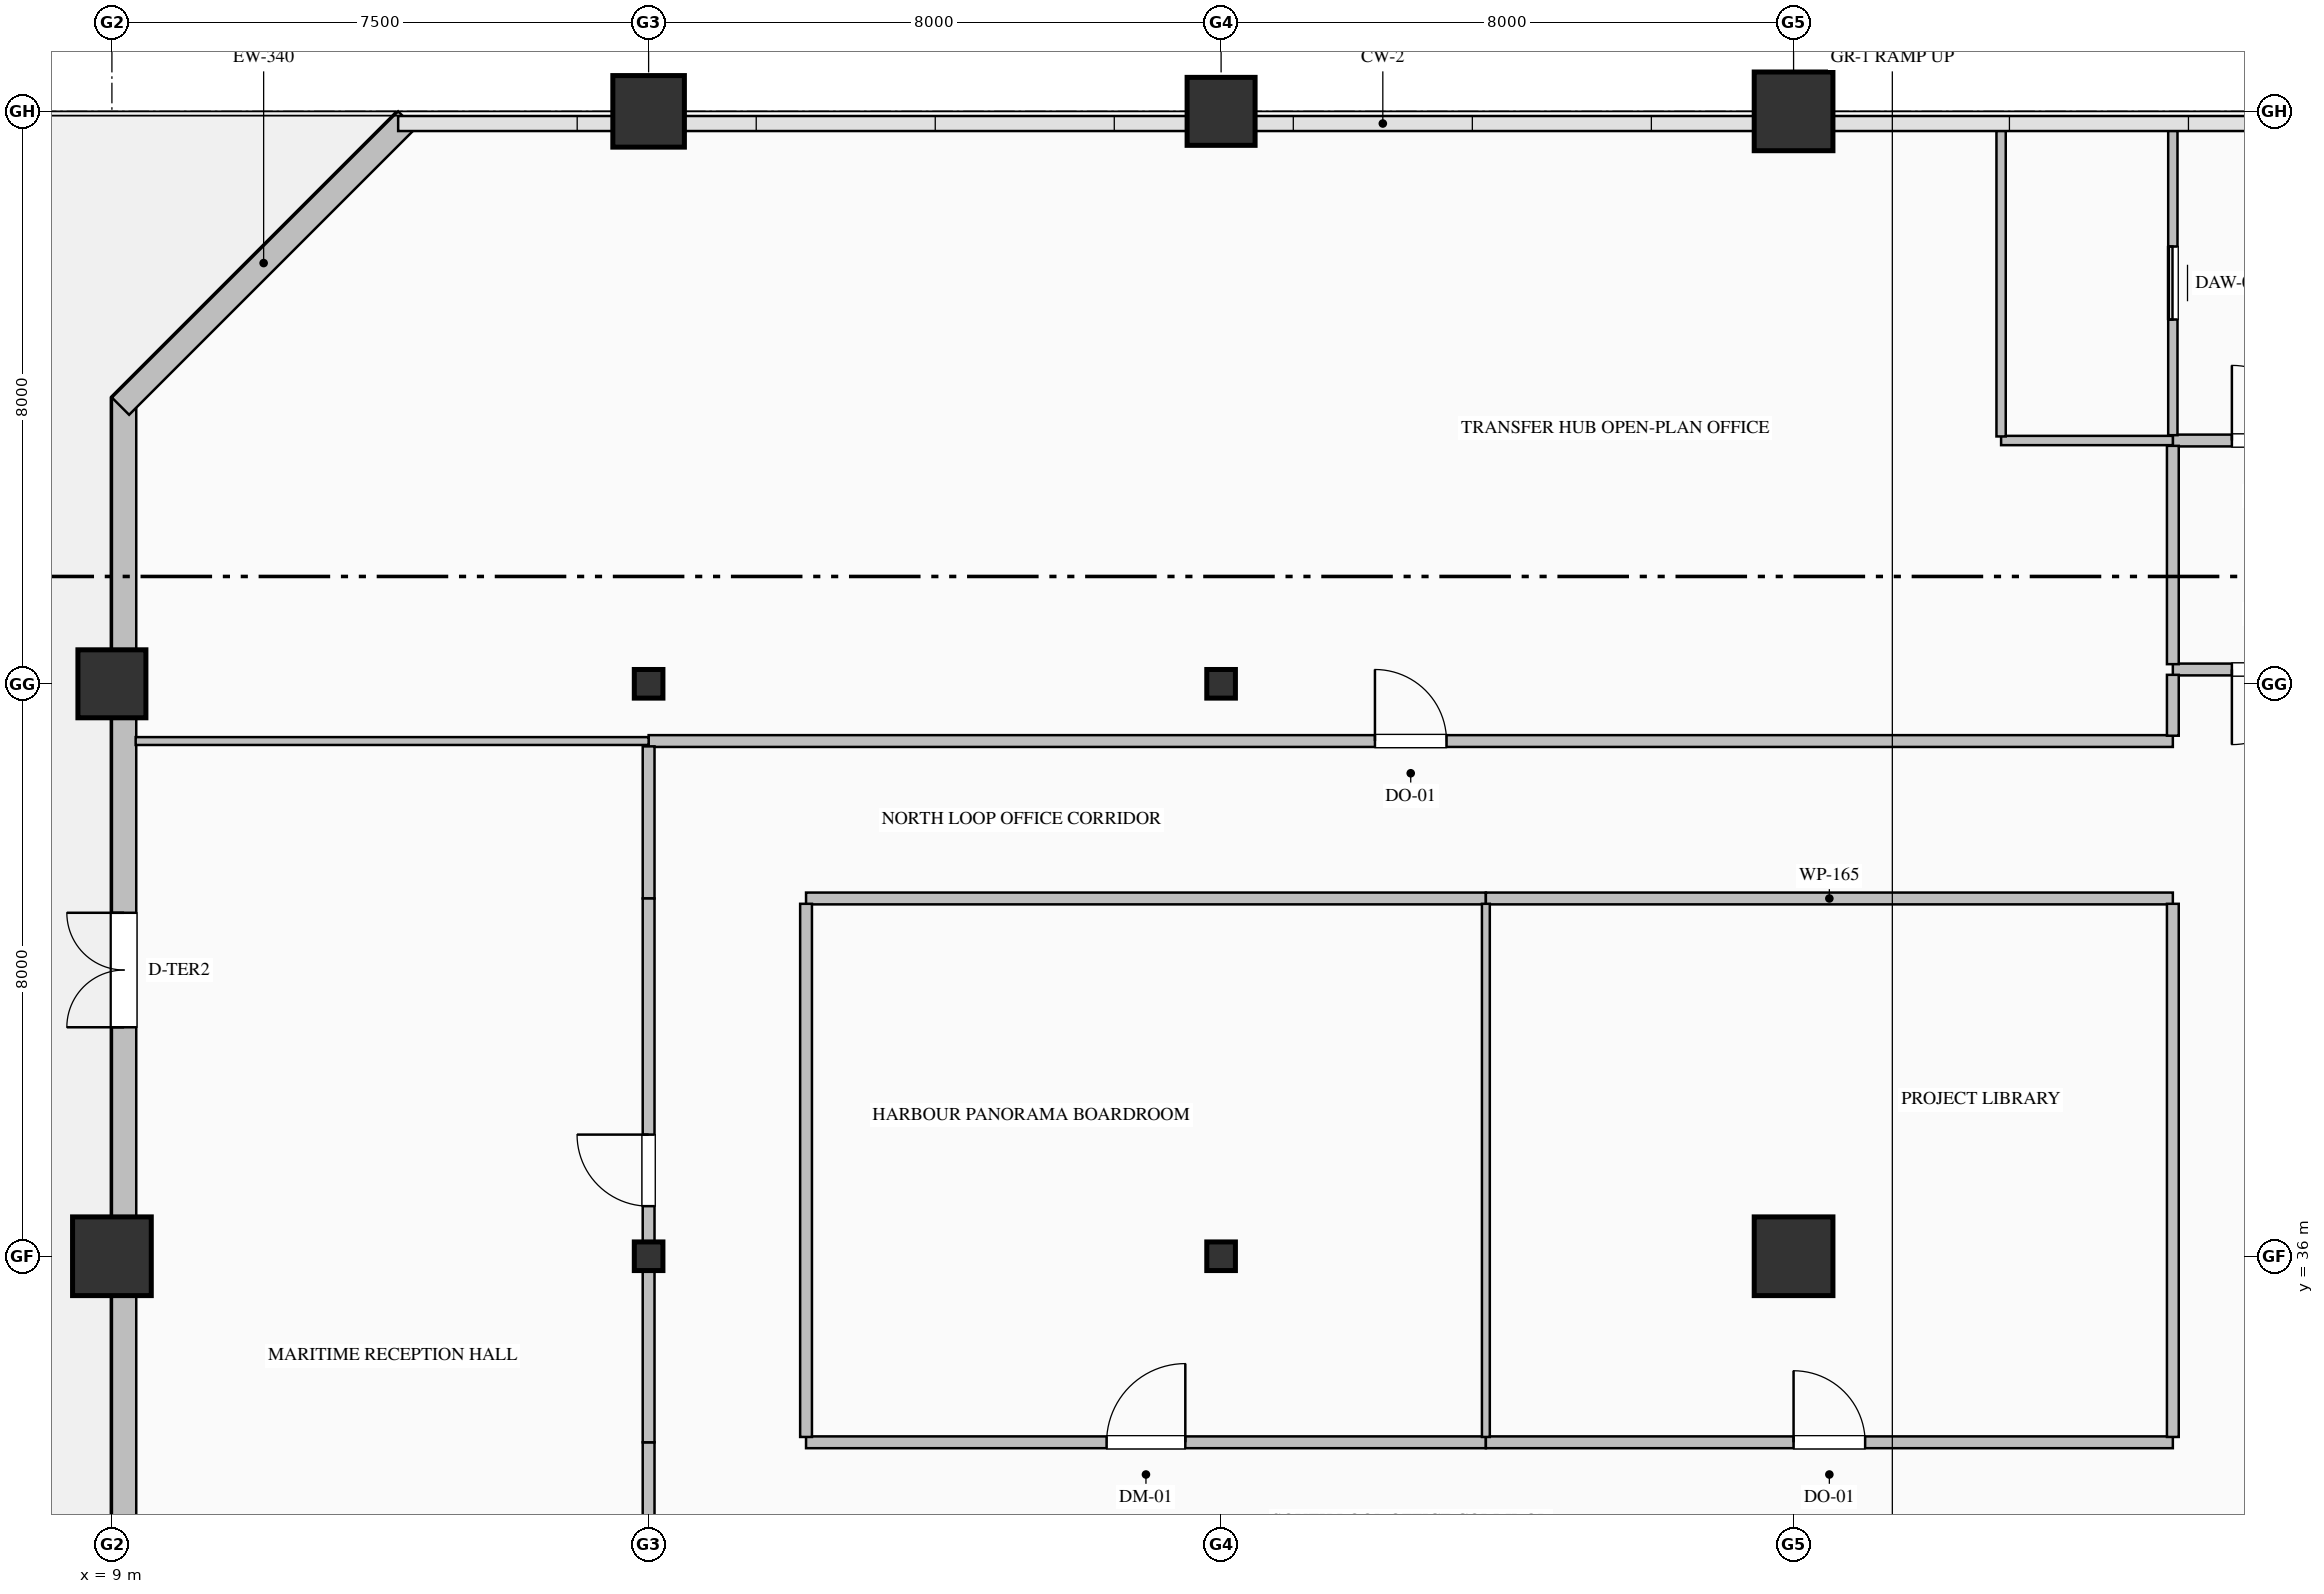
"""IFC4 building model, lengths in metres.
Left out: names, types, materials, properties, quantities, classifications, styles, units other than length and angle.
Written with IfcOpenShell. Run it as: python <this file> out.ifc"""

import sys

from ifc_helpers import new_model, si_unit, direction, frame, frame_2d, origin, origin_2d, place, context, subcontext, project, spatial, rectangle, hollow_rectangle, hollow_circle, i_section, extrude, element, fill, save


model = new_model("IFC4")
c1 = context("Model", 3, precision=1e-05, world=origin(), true_north=direction((0.0, 1.0)))
c2 = subcontext(c1, "Body", "Model", "MODEL_VIEW")
j1 = project(units=[si_unit("LENGTHUNIT", "METRE"), si_unit("PLANEANGLEUNIT", "RADIAN")], contexts=[c1])
p1 = place(None, origin())
s1 = spatial("IfcSite", under=j1, at=p1, CompositionType="ELEMENT")
p2 = place(p1, origin())
s2 = spatial("IfcBuilding", under=s1, at=p2, CompositionType="ELEMENT")
p3 = place(p2, frame((0.0, 0.0, 113.6)))
s3 = spatial("IfcBuildingStorey", under=s2, at=p3, CompositionType="ELEMENT", Elevation=113.6)
p4 = place(p3, frame((9.0, 36.0, 0.0), z_axis=(0.0, 0.0, 1.0), x_axis=(1.0, 0.0, 0.0)))
e1 = element("IfcColumn", 1, at=p4, inside=s3, PredefinedType="COLUMN", context=c2, shape_type="SweptSolid", body=[
    extrude(hollow_rectangle(XDim=1.1, YDim=1.1, WallThickness=0.04, at=origin_2d()), origin(), (0.0, 0.0, 1.0), 5.4),
])
p5 = place(p3, frame((9.0, 44.0, 0.0), z_axis=(0.0, 0.0, 1.0), x_axis=(1.0, 0.0, 0.0)))
e2 = element("IfcColumn", 2, at=p5, inside=s3, PredefinedType="COLUMN", context=c2, shape_type="SweptSolid", body=[
    extrude(hollow_rectangle(XDim=0.95, YDim=0.95, WallThickness=0.036, at=origin_2d()), origin(), (0.0, 0.0, 1.0), 5.4),
])
for number, where, z_axis, x_axis in (
    (3, (16.5, 36.0, 0.0), (0.0, 0.0, 1.0), (1.0, 0.0, 0.0)),
    (4, (16.5, 44.0, 0.0), (0.0, 0.0, 1.0), (1.0, 0.0, 0.0)),
):
    element("IfcColumn", number, at=place(p3, frame(where, z_axis=z_axis, x_axis=x_axis)), inside=s3, PredefinedType="COLUMN", context=c2, shape_type="SweptSolid", body=[
        extrude(i_section(OverallWidth=0.4, OverallDepth=0.4, WebThickness=0.013, FlangeThickness=0.021, FilletRadius=0.022, at=origin_2d()), origin(), (0.0, 0.0, 1.0), 5.4),
    ])
p6 = place(p3, frame((16.5, 52.0, 0.0), z_axis=(0.0, 0.0, 1.0), x_axis=(1.0, 0.0, 0.0)))
e5 = element("IfcColumn", 5, at=p6, inside=s3, PredefinedType="COLUMN", context=c2, shape_type="SweptSolid", body=[
    extrude(hollow_circle(Radius=0.5, WallThickness=0.036, at=origin_2d()), origin(), (0.0, 0.0, 1.0), 5.4),
])
for number, where, z_axis, x_axis in (
    (6, (24.5, 36.0, 0.0), (0.0, 0.0, 1.0), (1.0, 0.0, 0.0)),
    (7, (24.5, 44.0, 0.0), (0.0, 0.0, 1.0), (1.0, 0.0, 0.0)),
):
    element("IfcColumn", number, at=place(p3, frame(where, z_axis=z_axis, x_axis=x_axis)), inside=s3, PredefinedType="COLUMN", context=c2, shape_type="SweptSolid", body=[
        extrude(i_section(OverallWidth=0.4, OverallDepth=0.4, WebThickness=0.013, FlangeThickness=0.021, FilletRadius=0.022, at=origin_2d()), origin(), (0.0, 0.0, 1.0), 5.4),
    ])
p7 = place(p3, frame((24.5, 52.0, 0.0), z_axis=(0.0, 0.0, 1.0), x_axis=(1.0, 0.0, 0.0)))
e8 = element("IfcColumn", 8, at=p7, inside=s3, PredefinedType="COLUMN", context=c2, shape_type="SweptSolid", body=[
    extrude(hollow_rectangle(XDim=0.95, YDim=0.95, WallThickness=0.036, at=origin_2d()), origin(), (0.0, 0.0, 1.0), 5.4),
])
for number, where, z_axis, x_axis in (
    (9, (32.5, 36.0, 0.0), (0.0, 0.0, 1.0), (1.0, 0.0, 0.0)),
    (10, (32.5, 52.0, 0.0), (0.0, 0.0, 1.0), (1.0, 0.0, 0.0)),
):
    element("IfcColumn", number, at=place(p3, frame(where, z_axis=z_axis, x_axis=x_axis)), inside=s3, PredefinedType="COLUMN", context=c2, shape_type="SweptSolid", body=[
        extrude(hollow_rectangle(XDim=1.1, YDim=1.1, WallThickness=0.04, at=origin_2d()), origin(), (0.0, 0.0, 1.0), 5.4),
    ])
p8 = place(p3, frame((9.17, 32.0, 0.0), z_axis=(0.0, 0.0, 1.0), x_axis=(0.0, 1.0, 0.0)))
e11 = element("IfcWall", 11, at=p8, inside=s3, PredefinedType="SOLIDWALL", context=c2, shape_type="SweptSolid", body=[
    extrude(rectangle(XDim=16.0, YDim=0.34, at=frame_2d((8.0, 0.0))), origin(), (0.0, 0.0, 1.0), 4.665),
])
p9 = place(p8, frame((7.2, 0.0, 0.0)))
e12 = element("IfcOpeningElement", 12, at=p9, cuts=e11, PredefinedType="OPENING", context=c2, shape_type="SweptSolid", body=[
    extrude(rectangle(XDim=1.6, YDim=2.35, at=frame_2d((0.8, 1.175))), frame((0.0, 0.18, 0.0), z_axis=(0.0, -1.0, 0.0), x_axis=(1.0, 0.0, 0.0)), (0.0, 0.0, 1.0), 0.36),
])
p10 = place(p3, frame((9.12, 47.88, 0.0), z_axis=(0.0, 0.0, 1.0), x_axis=(0.707106781187, 0.707106781187, 0.0)))
e13 = element("IfcWall", 13, at=p10, inside=s3, PredefinedType="SOLIDWALL", context=c2, shape_type="SweptSolid", body=[
    extrude(rectangle(XDim=5.657, YDim=0.34, at=frame_2d((2.828, 0.0))), origin(), (0.0, 0.0, 1.0), 5.165),
])
p11 = place(p3, frame((37.8, 47.4, 0.0), z_axis=(0.0, 0.0, 1.0), x_axis=(1.0, 0.0, 0.0)))
e14 = element("IfcWall", 14, at=p11, inside=s3, PredefinedType="PARTITIONING", context=c2, shape_type="SweptSolid", body=[
    extrude(rectangle(XDim=2.7, YDim=0.165, at=frame_2d((1.35, 0.0))), origin(), (0.0, 0.0, 1.0), 5.165),
])
p12 = place(p11, frame((0.825, 0.0, 0.0)))
e15 = element("IfcOpeningElement", 15, at=p12, cuts=e14, PredefinedType="OPENING", context=c2, shape_type="SweptSolid", body=[
    extrude(rectangle(XDim=1.05, YDim=2.15, at=frame_2d((0.525, 1.075))), frame((0.0, 0.093, 0.0), z_axis=(0.0, -1.0, 0.0), x_axis=(1.0, 0.0, 0.0)), (0.0, 0.0, 1.0), 0.185),
])
p13 = place(p3, frame((40.5, 44.2, 0.0), z_axis=(0.0, 0.0, 1.0), x_axis=(-1.0, 0.0, 0.0)))
e16 = element("IfcWall", 16, at=p13, inside=s3, PredefinedType="PARTITIONING", context=c2, shape_type="SweptSolid", body=[
    extrude(rectangle(XDim=2.7, YDim=0.165, at=frame_2d((1.35, 0.0))), origin(), (0.0, 0.0, 1.0), 5.165),
])
p14 = place(p13, frame((0.825, 0.0, 0.0)))
e17 = element("IfcOpeningElement", 17, at=p14, cuts=e16, PredefinedType="OPENING", context=c2, shape_type="SweptSolid", body=[
    extrude(rectangle(XDim=1.05, YDim=2.15, at=frame_2d((0.525, 1.075))), frame((0.0, 0.093, 0.0), z_axis=(0.0, -1.0, 0.0), x_axis=(1.0, 0.0, 0.0)), (0.0, 0.0, 1.0), 0.185),
])
p15 = place(p3, frame((37.8, 44.274, 0.0), z_axis=(0.0, 0.0, 1.0), x_axis=(0.0, 1.0, 0.0)))
e18 = element("IfcWall", 18, at=p15, inside=s3, PredefinedType="PARTITIONING", context=c2, shape_type="SweptSolid", body=[
    extrude(rectangle(XDim=3.051, YDim=0.165, at=frame_2d((1.525, 0.0))), origin(), (0.0, 0.0, 1.0), 5.165),
])
p16 = place(p3, frame((37.8, 47.475, 0.0), z_axis=(0.0, 0.0, 1.0), x_axis=(0.0, 1.0, 0.0)))
e19 = element("IfcWall", 19, at=p16, inside=s3, PredefinedType="PARTITIONING", context=c2, shape_type="SweptSolid", body=[
    extrude(rectangle(XDim=4.253, YDim=0.13, at=frame_2d((2.127, 0.0))), origin(), (0.0, 0.0, 1.0), 5.165),
])
p17 = place(p16, frame((1.617, 0.0, 0.0)))
e20 = element("IfcOpeningElement", 20, at=p17, cuts=e19, PredefinedType="OPENING", context=c2, shape_type="SweptSolid", body=[
    extrude(rectangle(XDim=1.02, YDim=2.15, at=frame_2d((0.51, 1.075))), frame((0.0, 0.075, 0.0), z_axis=(0.0, -1.0, 0.0), x_axis=(1.0, 0.0, 0.0)), (0.0, 0.0, 1.0), 0.15),
])
p18 = place(p3, frame((37.8, 47.4, 0.0), z_axis=(0.0, 0.0, 1.0), x_axis=(-1.0, 0.0, 0.0)))
e21 = element("IfcWall", 21, at=p18, inside=s3, PredefinedType="PARTITIONING", context=c2, shape_type="SweptSolid", body=[
    extrude(rectangle(XDim=2.4, YDim=0.13, at=frame_2d((1.2, 0.0))), origin(), (0.0, 0.0, 1.0), 5.165),
])
p19 = place(p3, frame((35.4, 47.457, 0.0), z_axis=(0.0, 0.0, 1.0), x_axis=(0.0, 1.0, 0.0)))
e22 = element("IfcWall", 22, at=p19, inside=s3, PredefinedType="PARTITIONING", context=c2, shape_type="SweptSolid", body=[
    extrude(rectangle(XDim=4.271, YDim=0.13, at=frame_2d((2.135, 0.0))), origin(), (0.0, 0.0, 1.0), 5.165),
])
p20 = place(p3, frame((18.7, 33.4, 0.0), z_axis=(0.0, 0.0, 1.0), x_axis=(1.0, 0.0, 0.0)))
e23 = element("IfcWall", 23, at=p20, inside=s3, PredefinedType="PARTITIONING", context=c2, shape_type="SweptSolid", body=[
    extrude(rectangle(XDim=9.5, YDim=0.165, at=frame_2d((4.75, 0.0))), origin(), (0.0, 0.0, 1.0), 5.165),
])
p21 = place(p20, frame((4.2, 0.0, 0.0)))
e24 = element("IfcOpeningElement", 24, at=p21, cuts=e23, PredefinedType="OPENING", context=c2, shape_type="SweptSolid", body=[
    extrude(rectangle(XDim=1.1, YDim=2.2, at=frame_2d((0.55, 1.1))), frame((0.0, 0.093, 0.0), z_axis=(0.0, -1.0, 0.0), x_axis=(1.0, 0.0, 0.0)), (0.0, 0.0, 1.0), 0.185),
])
p22 = place(p3, frame((28.2, 33.4, 0.0), z_axis=(0.0, 0.0, 1.0), x_axis=(1.0, 0.0, 0.0)))
e25 = element("IfcWall", 25, at=p22, inside=s3, PredefinedType="PARTITIONING", context=c2, shape_type="SweptSolid", body=[
    extrude(rectangle(XDim=9.6, YDim=0.165, at=frame_2d((4.8, 0.0))), origin(), (0.0, 0.0, 1.0), 5.165),
])
p23 = place(p22, frame((4.3, 0.0, 0.0)))
e26 = element("IfcOpeningElement", 26, at=p23, cuts=e25, PredefinedType="OPENING", context=c2, shape_type="SweptSolid", body=[
    extrude(rectangle(XDim=1.0, YDim=2.15, at=frame_2d((0.5, 1.075))), frame((0.0, 0.093, 0.0), z_axis=(0.0, -1.0, 0.0), x_axis=(1.0, 0.0, 0.0)), (0.0, 0.0, 1.0), 0.185),
])
p24 = place(p3, frame((16.5, 31.274, 0.0), z_axis=(0.0, 0.0, 1.0), x_axis=(0.0, 1.0, 0.0)))
e27 = element("IfcWall", 27, at=p24, inside=s3, PredefinedType="PARTITIONING", context=c2, shape_type="SweptSolid", body=[
    extrude(rectangle(XDim=2.125, YDim=0.165, at=frame_2d((1.063, 0.0))), origin(), (0.0, 0.0, 1.0), 4.557),
])
p25 = place(p3, frame((16.5, 43.2, 0.0), z_axis=(0.0, 0.0, 1.0), x_axis=(1.0, 0.0, 0.0)))
e28 = element("IfcWall", 28, at=p25, inside=s3, PredefinedType="PARTITIONING", context=c2, shape_type="SweptSolid", body=[
    extrude(rectangle(XDim=21.3, YDim=0.165, at=frame_2d((10.65, 0.0))), origin(), (0.0, 0.0, 1.0), 5.165),
])
p26 = place(p25, frame((10.15, 0.0, 0.0)))
e29 = element("IfcOpeningElement", 29, at=p26, cuts=e28, PredefinedType="OPENING", context=c2, shape_type="SweptSolid", body=[
    extrude(rectangle(XDim=1.0, YDim=2.15, at=frame_2d((0.5, 1.075))), frame((0.0, 0.093, 0.0), z_axis=(0.0, -1.0, 0.0), x_axis=(1.0, 0.0, 0.0)), (0.0, 0.0, 1.0), 0.185),
])
p27 = place(p3, frame((28.2, 41.0, 0.0), z_axis=(0.0, 0.0, 1.0), x_axis=(-1.0, 0.0, 0.0)))
e30 = element("IfcWall", 30, at=p27, inside=s3, PredefinedType="PARTITIONING", context=c2, shape_type="SweptSolid", body=[
    extrude(rectangle(XDim=9.5, YDim=0.165, at=frame_2d((4.75, 0.0))), origin(), (0.0, 0.0, 1.0), 5.165),
])
p28 = place(p3, frame((37.8, 41.0, 0.0), z_axis=(0.0, 0.0, 1.0), x_axis=(-1.0, 0.0, 0.0)))
e31 = element("IfcWall", 31, at=p28, inside=s3, PredefinedType="PARTITIONING", context=c2, shape_type="SweptSolid", body=[
    extrude(rectangle(XDim=9.6, YDim=0.165, at=frame_2d((4.8, 0.0))), origin(), (0.0, 0.0, 1.0), 5.165),
])
p29 = place(p3, frame((16.5, 41.0, 0.0), z_axis=(0.0, 0.0, 1.0), x_axis=(0.0, 1.0, 0.0)))
e32 = element("IfcWall", 32, at=p29, inside=s3, PredefinedType="PARTITIONING", context=c2, shape_type="SweptSolid", body=[
    extrude(rectangle(XDim=2.125, YDim=0.165, at=frame_2d((1.063, 0.0))), origin(), (0.0, 0.0, 1.0), 4.557),
])
p30 = place(p3, frame((18.7, 40.926, 0.0), z_axis=(0.0, 0.0, 1.0), x_axis=(0.0, -1.0, 0.0)))
e33 = element("IfcWall", 33, at=p30, inside=s3, PredefinedType="PARTITIONING", context=c2, shape_type="SweptSolid", body=[
    extrude(rectangle(XDim=7.451, YDim=0.165, at=frame_2d((3.726, 0.0))), origin(), (0.0, 0.0, 1.0), 5.165),
])
p31 = place(p3, frame((16.5, 33.4, 0.0), z_axis=(0.0, 0.0, 1.0), x_axis=(0.0, 1.0, 0.0)))
e34 = element("IfcWall", 34, at=p31, inside=s3, PredefinedType="PARTITIONING", context=c2, shape_type="SweptSolid", body=[
    extrude(rectangle(XDim=7.6, YDim=0.165, at=frame_2d((3.8, 0.0))), origin(), (0.0, 0.0, 1.0), 4.557),
])
p32 = place(p31, frame((3.3, 0.0, 0.0)))
e35 = element("IfcOpeningElement", 35, at=p32, cuts=e34, PredefinedType="OPENING", context=c2, shape_type="SweptSolid", body=[
    extrude(rectangle(XDim=1.0, YDim=2.15, at=frame_2d((0.5, 1.075))), frame((0.0, 0.093, 0.0), z_axis=(0.0, -1.0, 0.0), x_axis=(1.0, 0.0, 0.0)), (0.0, 0.0, 1.0), 0.185),
])
p33 = place(p3, frame((37.8, 43.274, 0.0), z_axis=(0.0, 0.0, 1.0), x_axis=(0.0, 1.0, 0.0)))
e36 = element("IfcWall", 36, at=p33, inside=s3, PredefinedType="PARTITIONING", context=c2, shape_type="SweptSolid", body=[
    extrude(rectangle(XDim=0.851, YDim=0.165, at=frame_2d((0.426, 0.0))), origin(), (0.0, 0.0, 1.0), 5.165),
])
p34 = place(p3, frame((37.8, 33.475, 0.0), z_axis=(0.0, 0.0, 1.0), x_axis=(0.0, 1.0, 0.0)))
e37 = element("IfcWall", 37, at=p34, inside=s3, PredefinedType="PARTITIONING", context=c2, shape_type="SweptSolid", body=[
    extrude(rectangle(XDim=7.451, YDim=0.165, at=frame_2d((3.726, 0.0))), origin(), (0.0, 0.0, 1.0), 5.165),
])
p35 = place(p3, frame((16.5, 43.2, 0.0), z_axis=(0.0, 0.0, 1.0), x_axis=(-1.0, 0.0, 0.0)))
e38 = element("IfcWall", 38, at=p35, inside=s3, PredefinedType="MOVABLE", context=c2, shape_type="SweptSolid", body=[
    extrude(rectangle(XDim=7.168, YDim=0.11, at=frame_2d((3.584, 0.0))), origin(), (0.0, 0.0, 1.0), 5.165),
])
p36 = place(p3, frame((28.2, 40.926, 0.0), z_axis=(0.0, 0.0, 1.0), x_axis=(0.0, -1.0, 0.0)))
e39 = element("IfcWall", 39, at=p36, inside=s3, PredefinedType="MOVABLE", context=c2, shape_type="SweptSolid", body=[
    extrude(rectangle(XDim=7.451, YDim=0.11, at=frame_2d((3.726, 0.0))), origin(), (0.0, 0.0, 1.0), 5.165),
])
p37 = place(p9, origin())
e40 = element("IfcDoor", 40, at=p37, inside=s3, OperationType="DOUBLE_DOOR_SINGLE_SWING", PredefinedType="DOOR", context=c2, shape_type="SweptSolid", body=[
    extrude(rectangle(XDim=1.6, YDim=2.35, at=frame_2d((0.8, 1.175))), frame((0.0, 0.025, 0.0), z_axis=(0.0, -1.0, 0.0), x_axis=(1.0, 0.0, 0.0)), (0.0, 0.0, 1.0), 0.05),
])
fill(e12, e40)
p38 = place(p12, origin())
e41 = element("IfcDoor", 41, at=p38, inside=s3, OperationType="SINGLE_SWING_LEFT", PredefinedType="DOOR", context=c2, shape_type="SweptSolid", body=[
    extrude(rectangle(XDim=1.05, YDim=2.15, at=frame_2d((0.525, 1.075))), frame((0.0, 0.025, 0.0), z_axis=(0.0, -1.0, 0.0), x_axis=(1.0, 0.0, 0.0)), (0.0, 0.0, 1.0), 0.05),
])
fill(e15, e41)
p39 = place(p14, origin())
e42 = element("IfcDoor", 42, at=p39, inside=s3, OperationType="SINGLE_SWING_RIGHT", PredefinedType="DOOR", context=c2, shape_type="SweptSolid", body=[
    extrude(rectangle(XDim=1.05, YDim=2.15, at=frame_2d((0.525, 1.075))), frame((0.0, 0.025, 0.0), z_axis=(0.0, -1.0, 0.0), x_axis=(1.0, 0.0, 0.0)), (0.0, 0.0, 1.0), 0.05),
])
fill(e17, e42)
p40 = place(p17, origin())
e43 = element("IfcDoor", 43, at=p40, inside=s3, OperationType="SLIDING_TO_LEFT", PredefinedType="DOOR", context=c2, shape_type="SweptSolid", body=[
    extrude(rectangle(XDim=1.02, YDim=2.15, at=frame_2d((0.51, 1.075))), frame((0.0, 0.025, 0.0), z_axis=(0.0, -1.0, 0.0), x_axis=(1.0, 0.0, 0.0)), (0.0, 0.0, 1.0), 0.05),
])
fill(e20, e43)
p41 = place(p26, origin())
e44 = element("IfcDoor", 44, at=p41, inside=s3, OperationType="SINGLE_SWING_LEFT", PredefinedType="DOOR", context=c2, shape_type="SweptSolid", body=[
    extrude(rectangle(XDim=1.0, YDim=2.15, at=frame_2d((0.5, 1.075))), frame((0.0, 0.025, 0.0), z_axis=(0.0, -1.0, 0.0), x_axis=(1.0, 0.0, 0.0)), (0.0, 0.0, 1.0), 0.05),
])
fill(e29, e44)
p42 = place(p21, origin())
e45 = element("IfcDoor", 45, at=p42, inside=s3, OperationType="SINGLE_SWING_RIGHT", PredefinedType="DOOR", context=c2, shape_type="SweptSolid", body=[
    extrude(rectangle(XDim=1.1, YDim=2.2, at=frame_2d((0.55, 1.1))), frame((0.0, 0.025, 0.0), z_axis=(0.0, -1.0, 0.0), x_axis=(1.0, 0.0, 0.0)), (0.0, 0.0, 1.0), 0.05),
])
fill(e24, e45)
p43 = place(p23, origin())
e46 = element("IfcDoor", 46, at=p43, inside=s3, OperationType="SINGLE_SWING_LEFT", PredefinedType="DOOR", context=c2, shape_type="SweptSolid", body=[
    extrude(rectangle(XDim=1.0, YDim=2.15, at=frame_2d((0.5, 1.075))), frame((0.0, 0.025, 0.0), z_axis=(0.0, -1.0, 0.0), x_axis=(1.0, 0.0, 0.0)), (0.0, 0.0, 1.0), 0.05),
])
fill(e26, e46)
p44 = place(p32, origin())
e47 = element("IfcDoor", 47, at=p44, inside=s3, OperationType="SINGLE_SWING_RIGHT", PredefinedType="DOOR", context=c2, shape_type="SweptSolid", body=[
    extrude(rectangle(XDim=1.0, YDim=2.15, at=frame_2d((0.5, 1.075))), frame((0.0, 0.025, 0.0), z_axis=(0.0, -1.0, 0.0), x_axis=(1.0, 0.0, 0.0)), (0.0, 0.0, 1.0), 0.05),
])
fill(e35, e47)
save(model, sys.argv[1])
